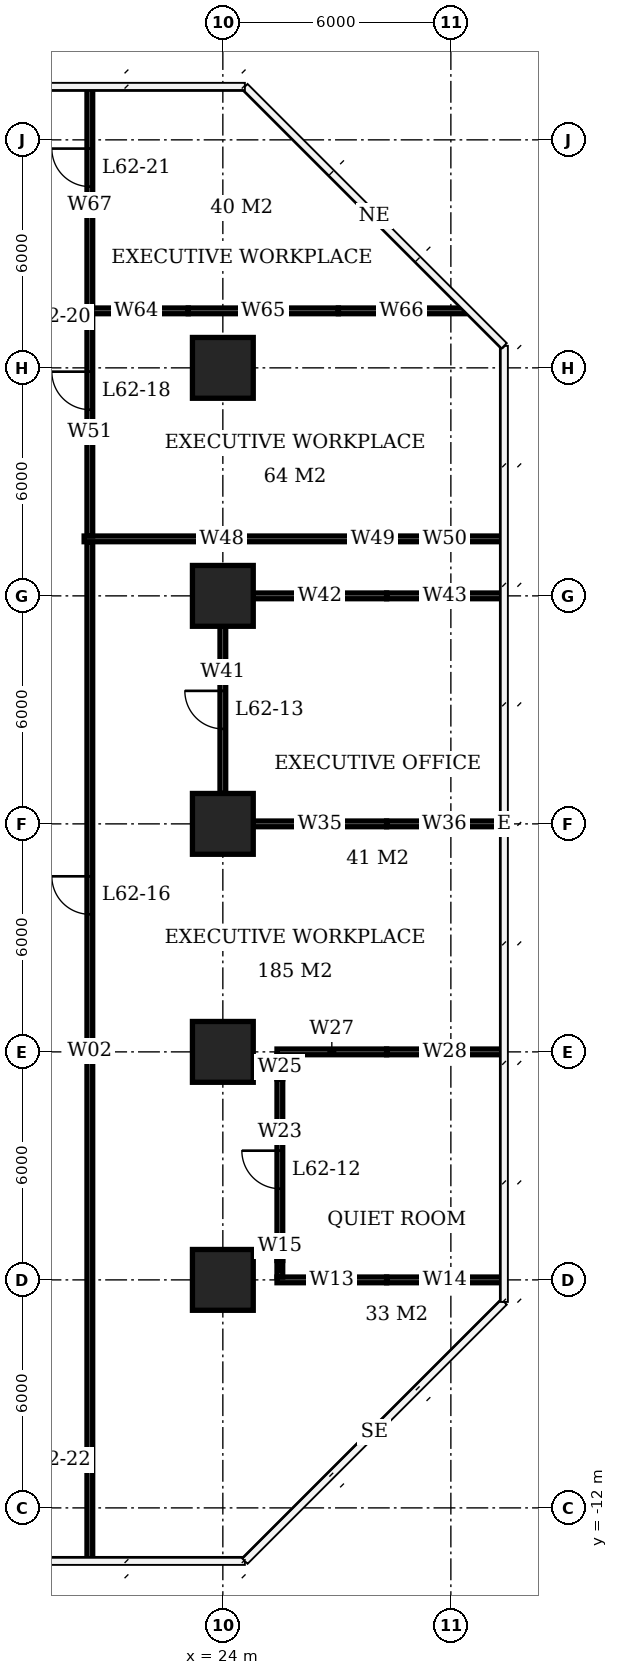
"""IFC4 building model, lengths in metres.
Left out: names, types, materials, properties, quantities, classifications, styles, units other than length and angle.
Written with IfcOpenShell. Run it as: python <this file> out.ifc"""

import sys

from ifc_helpers import new_model, si_unit, direction, frame, frame_2d, origin, origin_2d, place, context, subcontext, project, spatial, rectangle, extrude, element, fill, save


model = new_model("IFC4")
c1 = context("Model", 3, precision=1e-05, world=origin(), true_north=direction((0.0, 1.0)))
c2 = subcontext(c1, "Body", "Model", "MODEL_VIEW")
j1 = project(units=[si_unit("LENGTHUNIT", "METRE"), si_unit("PLANEANGLEUNIT", "RADIAN")], contexts=[c1])
p1 = place(None, origin())
s1 = spatial("IfcSite", under=j1, at=p1, CompositionType="ELEMENT")
p2 = place(p1, origin())
s2 = spatial("IfcBuilding", under=s1, at=p2, CompositionType="ELEMENT")
p3 = place(p2, frame((0.0, 0.0, 252.8)))
s3 = spatial("IfcBuildingStorey", under=s2, at=p3, CompositionType="ELEMENT", Elevation=252.8)
for number, where, z_axis, x_axis in (
    (1, (24.0, -6.0, 0.0), (0.0, 0.0, 1.0), (1.0, 0.0, 0.0)),
    (2, (24.0, 0.0, 0.0), (0.0, 0.0, 1.0), (1.0, 0.0, 0.0)),
    (3, (24.0, 6.0, 0.0), (0.0, 0.0, 1.0), (1.0, 0.0, 0.0)),
    (4, (24.0, 12.0, 0.0), (0.0, 0.0, 1.0), (1.0, 0.0, 0.0)),
    (5, (24.0, 18.0, 0.0), (0.0, 0.0, 1.0), (1.0, 0.0, 0.0)),
):
    element("IfcColumn", number, at=place(p3, frame(where, z_axis=z_axis, x_axis=x_axis)), inside=s3, PredefinedType="COLUMN", context=c2, shape_type="SweptSolid", body=[
        extrude(rectangle(XDim=1.6, YDim=1.6, at=origin_2d()), origin(), (0.0, 0.0, 1.0), 3.9),
    ])
p4 = place(p3, frame((25.425, -6.0, 0.0), z_axis=(0.0, 0.0, 1.0), x_axis=(1.0, 0.0, 0.0)))
e6 = element("IfcWall", 6, at=p4, inside=s3, PredefinedType="PARTITIONING", context=c2, shape_type="SweptSolid", body=[
    extrude(rectangle(XDim=2.885, YDim=0.15, at=frame_2d((1.442, 0.0))), origin(), (0.0, 0.0, 1.0), 2.65),
])
p5 = place(p3, frame((28.31, -6.0, 0.0), z_axis=(0.0, 0.0, 1.0), x_axis=(1.0, 0.0, 0.0)))
e7 = element("IfcWall", 7, at=p5, inside=s3, PredefinedType="PARTITIONING", context=c2, shape_type="SweptSolid", body=[
    extrude(rectangle(XDim=3.065, YDim=0.15, at=frame_2d((1.532, 0.0))), origin(), (0.0, 0.0, 1.0), 3.65),
])
p6 = place(p3, frame((25.425, 0.0, 0.0), z_axis=(0.0, 0.0, 1.0), x_axis=(1.0, 0.0, 0.0)))
e8 = element("IfcWall", 8, at=p6, inside=s3, PredefinedType="PARTITIONING", context=c2, shape_type="SweptSolid", body=[
    extrude(rectangle(XDim=2.885, YDim=0.15, at=frame_2d((1.442, 0.0))), origin(), (0.0, 0.0, 1.0), 2.65),
])
p7 = place(p3, frame((28.31, 0.0, 0.0), z_axis=(0.0, 0.0, 1.0), x_axis=(1.0, 0.0, 0.0)))
e9 = element("IfcWall", 9, at=p7, inside=s3, PredefinedType="PARTITIONING", context=c2, shape_type="SweptSolid", body=[
    extrude(rectangle(XDim=3.065, YDim=0.15, at=frame_2d((1.532, 0.0))), origin(), (0.0, 0.0, 1.0), 3.65),
])
p8 = place(p3, frame((24.8, 6.0, 0.0), z_axis=(0.0, 0.0, 1.0), x_axis=(1.0, 0.0, 0.0)))
e10 = element("IfcWall", 10, at=p8, inside=s3, PredefinedType="PARTITIONING", context=c2, shape_type="SweptSolid", body=[
    extrude(rectangle(XDim=3.51, YDim=0.15, at=frame_2d((1.755, 0.0))), origin(), (0.0, 0.0, 1.0), 2.65),
])
p9 = place(p3, frame((28.31, 6.0, 0.0), z_axis=(0.0, 0.0, 1.0), x_axis=(1.0, 0.0, 0.0)))
e11 = element("IfcWall", 11, at=p9, inside=s3, PredefinedType="PARTITIONING", context=c2, shape_type="SweptSolid", body=[
    extrude(rectangle(XDim=3.04, YDim=0.15, at=frame_2d((1.52, 0.0))), origin(), (0.0, 0.0, 1.0), 3.65),
])
p10 = place(p3, frame((24.8, 12.0, 0.0), z_axis=(0.0, 0.0, 1.0), x_axis=(1.0, 0.0, 0.0)))
e12 = element("IfcWall", 12, at=p10, inside=s3, PredefinedType="PARTITIONING", context=c2, shape_type="SweptSolid", body=[
    extrude(rectangle(XDim=3.51, YDim=0.15, at=frame_2d((1.755, 0.0))), origin(), (0.0, 0.0, 1.0), 2.65),
])
p11 = place(p3, frame((28.31, 12.0, 0.0), z_axis=(0.0, 0.0, 1.0), x_axis=(1.0, 0.0, 0.0)))
e13 = element("IfcWall", 13, at=p11, inside=s3, PredefinedType="PARTITIONING", context=c2, shape_type="SweptSolid", body=[
    extrude(rectangle(XDim=3.065, YDim=0.15, at=frame_2d((1.532, 0.0))), origin(), (0.0, 0.0, 1.0), 3.65),
])
p12 = place(p3, frame((24.0, 6.8, 0.0), z_axis=(0.0, 0.0, 1.0), x_axis=(0.0, 1.0, 0.0)))
e14 = element("IfcWall", 14, at=p12, inside=s3, PredefinedType="PARTITIONING", context=c2, shape_type="SweptSolid", body=[
    extrude(rectangle(XDim=4.4, YDim=0.15, at=frame_2d((2.2, 0.0))), origin(), (0.0, 0.0, 1.0), 3.65),
])
p13 = place(p12, frame((1.7, 0.0, 0.0)))
e15 = element("IfcOpeningElement", 15, at=p13, cuts=e14, PredefinedType="OPENING", context=c2, shape_type="SweptSolid", body=[
    extrude(rectangle(XDim=1.0, YDim=2.4, at=frame_2d((0.5, 1.2))), frame((0.0, 0.085, 0.0), z_axis=(0.0, -1.0, 0.0), x_axis=(1.0, 0.0, 0.0)), (0.0, 0.0, 1.0), 0.17),
])
p14 = place(p3, frame((25.5, -5.925, 0.0), z_axis=(0.0, 0.0, 1.0), x_axis=(0.0, 1.0, 0.0)))
e16 = element("IfcWall", 16, at=p14, inside=s3, PredefinedType="PARTITIONING", context=c2, shape_type="SweptSolid", body=[
    extrude(rectangle(XDim=0.435, YDim=0.15, at=frame_2d((0.218, 0.0))), origin(), (0.0, 0.0, 1.0), 2.65),
])
p15 = place(p3, frame((25.5, -5.49, 0.0), z_axis=(0.0, 0.0, 1.0), x_axis=(0.0, 1.0, 0.0)))
e17 = element("IfcWall", 17, at=p15, inside=s3, PredefinedType="PARTITIONING", context=c2, shape_type="SweptSolid", body=[
    extrude(rectangle(XDim=4.78, YDim=0.15, at=frame_2d((2.39, 0.0))), origin(), (0.0, 0.0, 1.0), 3.65),
])
p16 = place(p15, frame((1.89, 0.0, 0.0)))
e18 = element("IfcOpeningElement", 18, at=p16, cuts=e17, PredefinedType="OPENING", context=c2, shape_type="SweptSolid", body=[
    extrude(rectangle(XDim=1.0, YDim=2.4, at=frame_2d((0.5, 1.2))), frame((0.0, 0.085, 0.0), z_axis=(0.0, -1.0, 0.0), x_axis=(1.0, 0.0, 0.0)), (0.0, 0.0, 1.0), 0.17),
])
p17 = place(p3, frame((25.5, -0.71, 0.0), z_axis=(0.0, 0.0, 1.0), x_axis=(0.0, 1.0, 0.0)))
e19 = element("IfcWall", 19, at=p17, inside=s3, PredefinedType="PARTITIONING", context=c2, shape_type="SweptSolid", body=[
    extrude(rectangle(XDim=0.635, YDim=0.15, at=frame_2d((0.317, 0.0))), origin(), (0.0, 0.0, 1.0), 2.65),
])
p18 = place(p3, frame((20.5, -13.375, 0.0), z_axis=(0.0, 0.0, 1.0), x_axis=(0.0, 1.0, 0.0)))
e20 = element("IfcWall", 20, at=p18, inside=s3, PredefinedType="PARTITIONING", context=c2, shape_type="SweptSolid", body=[
    extrude(rectangle(XDim=26.8, YDim=0.15, at=frame_2d((13.4, 0.0))), origin(), (0.0, 0.0, 1.0), 3.65),
])
p19 = place(p18, frame((16.995, 0.0, 0.0)))
e21 = element("IfcOpeningElement", 21, at=p19, cuts=e20, PredefinedType="OPENING", context=c2, shape_type="SweptSolid", body=[
    extrude(rectangle(XDim=1.0, YDim=2.4, at=frame_2d((0.5, 1.2))), frame((0.0, 0.085, 0.0), z_axis=(0.0, -1.0, 0.0), x_axis=(1.0, 0.0, 0.0)), (0.0, 0.0, 1.0), 0.17),
])
p20 = place(p3, frame((20.5, 13.575, 0.0), z_axis=(0.0, 0.0, 1.0), x_axis=(0.0, 1.0, 0.0)))
e22 = element("IfcWall", 22, at=p20, inside=s3, PredefinedType="PARTITIONING", context=c2, shape_type="SweptSolid", body=[
    extrude(rectangle(XDim=5.85, YDim=0.15, at=frame_2d((2.925, 0.0))), origin(), (0.0, 0.0, 1.0), 3.65),
])
p21 = place(p20, frame((3.325, 0.0, 0.0)))
e23 = element("IfcOpeningElement", 23, at=p21, cuts=e22, PredefinedType="OPENING", context=c2, shape_type="SweptSolid", body=[
    extrude(rectangle(XDim=1.0, YDim=2.4, at=frame_2d((0.5, 1.2))), frame((0.0, 0.085, 0.0), z_axis=(0.0, -1.0, 0.0), x_axis=(1.0, 0.0, 0.0)), (0.0, 0.0, 1.0), 0.17),
])
p22 = place(p3, frame((20.35, 13.5, 0.0), z_axis=(0.0, 0.0, 1.0), x_axis=(1.0, 0.0, 0.0)))
e24 = element("IfcWall", 24, at=p22, inside=s3, PredefinedType="PARTITIONING", context=c2, shape_type="SweptSolid", body=[
    extrude(rectangle(XDim=7.24, YDim=0.15, at=frame_2d((3.62, 0.0))), origin(), (0.0, 0.0, 1.0), 3.65),
])
p23 = place(p3, frame((27.59, 13.5, 0.0), z_axis=(0.0, 0.0, 1.0), x_axis=(1.0, 0.0, 0.0)))
e25 = element("IfcWall", 25, at=p23, inside=s3, PredefinedType="PARTITIONING", context=c2, shape_type="SweptSolid", body=[
    extrude(rectangle(XDim=0.72, YDim=0.15, at=frame_2d((0.36, 0.0))), origin(), (0.0, 0.0, 1.0), 2.65),
])
p24 = place(p3, frame((28.31, 13.5, 0.0), z_axis=(0.0, 0.0, 1.0), x_axis=(1.0, 0.0, 0.0)))
e26 = element("IfcWall", 26, at=p24, inside=s3, PredefinedType="PARTITIONING", context=c2, shape_type="SweptSolid", body=[
    extrude(rectangle(XDim=3.065, YDim=0.15, at=frame_2d((1.532, 0.0))), origin(), (0.0, 0.0, 1.0), 3.65),
])
p25 = place(p3, frame((20.5, 19.575, 0.0), z_axis=(0.0, 0.0, 1.0), x_axis=(0.0, 1.0, 0.0)))
e27 = element("IfcWall", 27, at=p25, inside=s3, PredefinedType="PARTITIONING", context=c2, shape_type="SweptSolid", body=[
    extrude(rectangle(XDim=5.8, YDim=0.15, at=frame_2d((2.9, 0.0))), origin(), (0.0, 0.0, 1.0), 3.65),
])
p26 = place(p25, frame((3.195, 0.0, 0.0)))
e28 = element("IfcOpeningElement", 28, at=p26, cuts=e27, PredefinedType="OPENING", context=c2, shape_type="SweptSolid", body=[
    extrude(rectangle(XDim=1.0, YDim=2.4, at=frame_2d((0.5, 1.2))), frame((0.0, 0.085, 0.0), z_axis=(0.0, -1.0, 0.0), x_axis=(1.0, 0.0, 0.0)), (0.0, 0.0, 1.0), 0.17),
])
p27 = place(p3, frame((20.35, 19.5, 0.0), z_axis=(0.0, 0.0, 1.0), x_axis=(1.0, 0.0, 0.0)))
e29 = element("IfcWall", 29, at=p27, inside=s3, PredefinedType="PARTITIONING", context=c2, shape_type="SweptSolid", body=[
    extrude(rectangle(XDim=2.74, YDim=0.15, at=frame_2d((1.37, 0.0))), origin(), (0.0, 0.0, 1.0), 3.65),
])
p28 = place(p3, frame((23.09, 19.5, 0.0), z_axis=(0.0, 0.0, 1.0), x_axis=(1.0, 0.0, 0.0)))
e30 = element("IfcWall", 30, at=p28, inside=s3, PredefinedType="PARTITIONING", context=c2, shape_type="SweptSolid", body=[
    extrude(rectangle(XDim=3.95, YDim=0.15, at=frame_2d((1.975, 0.0))), origin(), (0.0, 0.0, 1.0), 2.65),
])
p29 = place(p3, frame((27.04, 19.5, 0.0), z_axis=(0.0, 0.0, 1.0), x_axis=(1.0, 0.0, 0.0)))
e31 = element("IfcWall", 31, at=p29, inside=s3, PredefinedType="PARTITIONING", context=c2, shape_type="SweptSolid", body=[
    extrude(rectangle(XDim=3.323, YDim=0.15, at=frame_2d((1.662, 0.0))), origin(), (0.0, 0.0, 1.0), 3.65),
])
p30 = place(p16, origin())
e32 = element("IfcDoor", 32, at=p30, inside=s3, OperationType="SINGLE_SWING_RIGHT", PredefinedType="DOOR", context=c2, shape_type="SweptSolid", body=[
    extrude(rectangle(XDim=1.0, YDim=2.4, at=frame_2d((0.5, 1.2))), frame((0.0, 0.025, 0.0), z_axis=(0.0, -1.0, 0.0), x_axis=(1.0, 0.0, 0.0)), (0.0, 0.0, 1.0), 0.05),
])
fill(e18, e32)
p31 = place(p13, origin())
e33 = element("IfcDoor", 33, at=p31, inside=s3, OperationType="SINGLE_SWING_RIGHT", PredefinedType="DOOR", context=c2, shape_type="SweptSolid", body=[
    extrude(rectangle(XDim=1.0, YDim=2.4, at=frame_2d((0.5, 1.2))), frame((0.0, 0.025, 0.0), z_axis=(0.0, -1.0, 0.0), x_axis=(1.0, 0.0, 0.0)), (0.0, 0.0, 1.0), 0.05),
])
fill(e15, e33)
p32 = place(p19, origin())
e34 = element("IfcDoor", 34, at=p32, inside=s3, OperationType="SINGLE_SWING_RIGHT", PredefinedType="DOOR", context=c2, shape_type="SweptSolid", body=[
    extrude(rectangle(XDim=1.0, YDim=2.4, at=frame_2d((0.5, 1.2))), frame((0.0, 0.025, 0.0), z_axis=(0.0, -1.0, 0.0), x_axis=(1.0, 0.0, 0.0)), (0.0, 0.0, 1.0), 0.05),
])
fill(e21, e34)
p33 = place(p21, origin())
e35 = element("IfcDoor", 35, at=p33, inside=s3, OperationType="SINGLE_SWING_RIGHT", PredefinedType="DOOR", context=c2, shape_type="SweptSolid", body=[
    extrude(rectangle(XDim=1.0, YDim=2.4, at=frame_2d((0.5, 1.2))), frame((0.0, 0.025, 0.0), z_axis=(0.0, -1.0, 0.0), x_axis=(1.0, 0.0, 0.0)), (0.0, 0.0, 1.0), 0.05),
])
fill(e23, e35)
p34 = place(p26, origin())
e36 = element("IfcDoor", 36, at=p34, inside=s3, OperationType="SINGLE_SWING_RIGHT", PredefinedType="DOOR", context=c2, shape_type="SweptSolid", body=[
    extrude(rectangle(XDim=1.0, YDim=2.4, at=frame_2d((0.5, 1.2))), frame((0.0, 0.025, 0.0), z_axis=(0.0, -1.0, 0.0), x_axis=(1.0, 0.0, 0.0)), (0.0, 0.0, 1.0), 0.05),
])
fill(e28, e36)
save(model, sys.argv[1])
